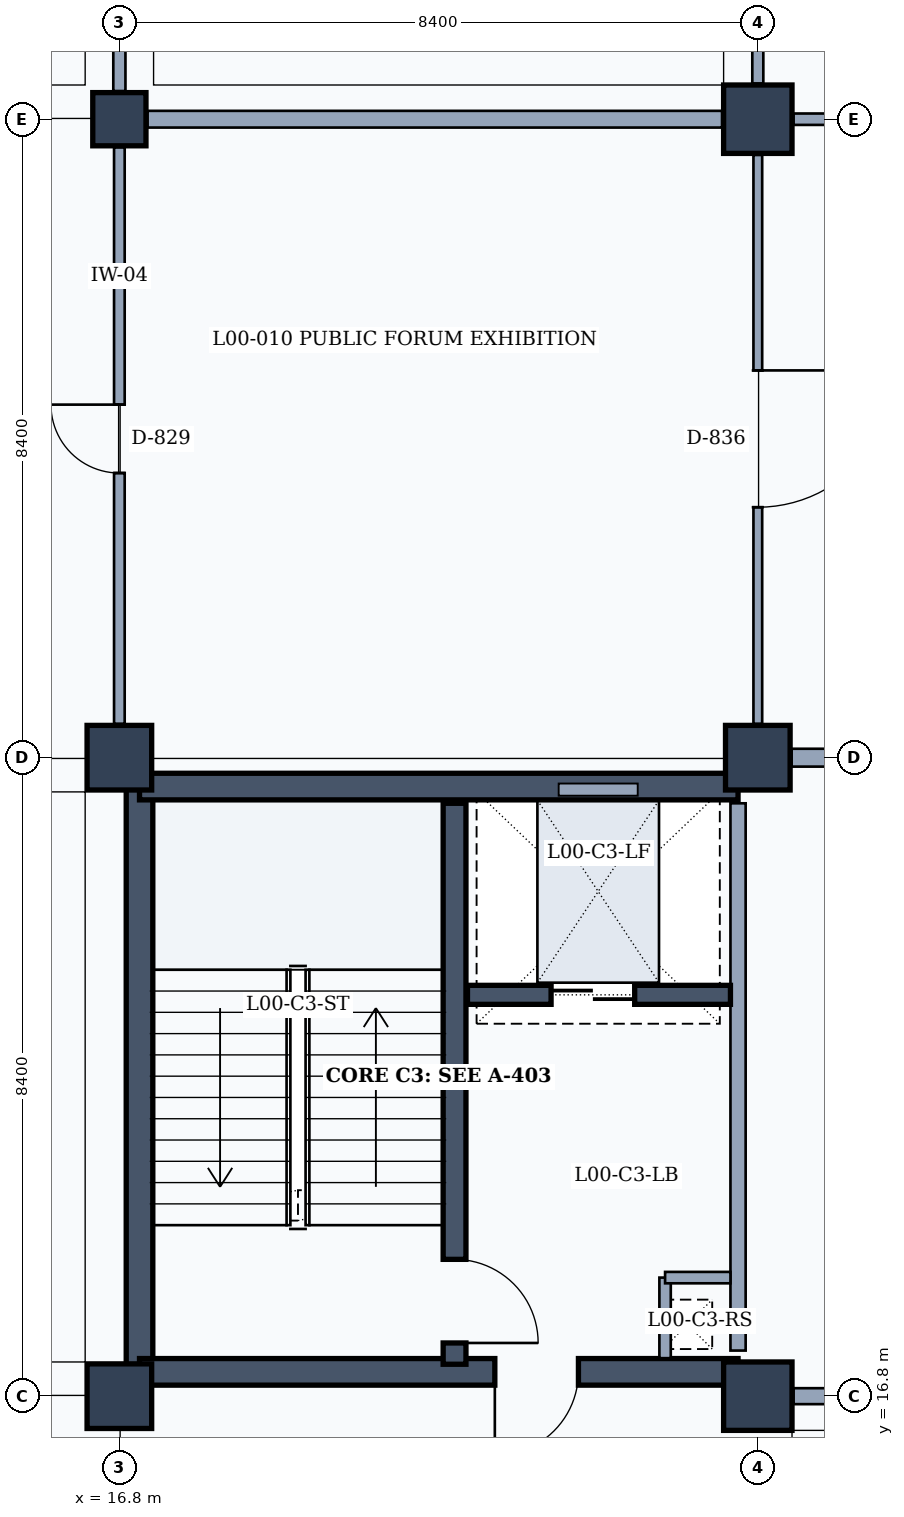
"""IFC4 building model, lengths in metres.
Left out: names, types, materials, properties, quantities, classifications, styles, units other than length and angle.
Written with IfcOpenShell. Run it as: python <this file> out.ifc"""

import sys

from ifc_helpers import new_model, si_unit, direction, frame, frame_2d, origin, origin_2d, place, context, subcontext, project, spatial, rectangle, extrude, element, fill, save


model = new_model("IFC4")
c1 = context("Model", 3, precision=1e-05, world=origin(), true_north=direction((0.0, 1.0)))
c2 = subcontext(c1, "Body", "Model", "MODEL_VIEW")
j1 = project(units=[si_unit("LENGTHUNIT", "METRE"), si_unit("PLANEANGLEUNIT", "RADIAN")], contexts=[c1])
p1 = place(None, origin())
s1 = spatial("IfcSite", under=j1, at=p1, CompositionType="ELEMENT")
p2 = place(p1, origin())
s2 = spatial("IfcBuilding", under=s1, at=p2, CompositionType="ELEMENT")
p3 = place(p2, origin())
s3 = spatial("IfcBuildingStorey", under=s2, at=p3, CompositionType="ELEMENT", Elevation=0.0)
for number, where, z_axis, x_axis in (
    (1, (16.8, 16.8, 0.0), (0.0, 0.0, 1.0), (1.0, 0.0, 0.0)),
    (2, (16.8, 25.2, 0.0), (0.0, 0.0, 1.0), (1.0, 0.0, 0.0)),
):
    element("IfcColumn", number, at=place(p3, frame(where, z_axis=z_axis, x_axis=x_axis)), inside=s3, PredefinedType="COLUMN", context=c2, shape_type="SweptSolid", body=[
        extrude(rectangle(XDim=0.85, YDim=0.85, at=origin_2d()), origin(), (0.0, 0.0, 1.0), 4.8),
    ])
p4 = place(p3, frame((16.8, 33.6, 0.0), z_axis=(0.0, 0.0, 1.0), x_axis=(1.0, 0.0, 0.0)))
e3 = element("IfcColumn", 3, at=p4, inside=s3, PredefinedType="COLUMN", context=c2, shape_type="SweptSolid", body=[
    extrude(rectangle(XDim=0.7, YDim=0.7, at=origin_2d()), origin(), (0.0, 0.0, 1.0), 4.8),
])
p5 = place(p3, frame((25.2, 16.8, 0.0), z_axis=(0.0, 0.0, 1.0), x_axis=(1.0, 0.0, 0.0)))
e4 = element("IfcColumn", 4, at=p5, inside=s3, PredefinedType="COLUMN", context=c2, shape_type="SweptSolid", body=[
    extrude(rectangle(XDim=0.9, YDim=0.9, at=origin_2d()), origin(), (0.0, 0.0, 1.0), 4.8),
])
p6 = place(p3, frame((25.2, 25.2, 0.0), z_axis=(0.0, 0.0, 1.0), x_axis=(1.0, 0.0, 0.0)))
e5 = element("IfcColumn", 5, at=p6, inside=s3, PredefinedType="COLUMN", context=c2, shape_type="SweptSolid", body=[
    extrude(rectangle(XDim=0.85, YDim=0.85, at=origin_2d()), origin(), (0.0, 0.0, 1.0), 4.8),
])
p7 = place(p3, frame((25.2, 33.6, 0.0), z_axis=(0.0, 0.0, 1.0), x_axis=(1.0, 0.0, 0.0)))
e6 = element("IfcColumn", 6, at=p7, inside=s3, PredefinedType="COLUMN", context=c2, shape_type="SweptSolid", body=[
    extrude(rectangle(XDim=0.9, YDim=0.9, at=origin_2d()), origin(), (0.0, 0.0, 1.0), 4.8),
])
p8 = place(p3, frame((17.065, 17.05, 0.0), z_axis=(0.0, 0.0, 1.0), x_axis=(0.0, 1.0, 0.0)))
e7 = element("IfcWall", 7, at=p8, inside=s3, PredefinedType="SHEAR", context=c2, shape_type="SweptSolid", body=[
    extrude(rectangle(XDim=7.94, YDim=0.35, at=frame_2d((3.97, 0.0))), origin(), (0.0, 0.0, 1.0), 4.54),
])
p9 = place(p3, frame((17.065, 24.82, 0.0), z_axis=(0.0, 0.0, 1.0), x_axis=(1.0, 0.0, 0.0)))
e8 = element("IfcWall", 8, at=p9, inside=s3, PredefinedType="SHEAR", context=c2, shape_type="SweptSolid", body=[
    extrude(rectangle(XDim=7.875, YDim=0.35, at=frame_2d((3.938, 0.0))), origin(), (0.0, 0.0, 1.0), 4.54),
])
p10 = place(p3, frame((24.94, 24.6, 0.0), z_axis=(0.0, 0.0, 1.0), x_axis=(0.0, -1.0, 0.0)))
e9 = element("IfcWall", 9, at=p10, inside=s3, PredefinedType="PARTITIONING", context=c2, shape_type="SweptSolid", body=[
    extrude(rectangle(XDim=7.2, YDim=0.2, at=frame_2d((3.6, 0.0))), origin(), (0.0, 0.0, 1.0), 3.92),
])
p11 = place(p3, frame((24.94, 17.12, 0.0), z_axis=(0.0, 0.0, 1.0), x_axis=(-1.0, 0.0, 0.0)))
e10 = element("IfcWall", 10, at=p11, inside=s3, PredefinedType="SHEAR", context=c2, shape_type="SweptSolid", body=[
    extrude(rectangle(XDim=7.875, YDim=0.35, at=frame_2d((3.938, 0.0))), origin(), (0.0, 0.0, 1.0), 4.54),
])
p12 = place(p11, frame((2.1, 0.0, 0.0)))
e11 = element("IfcOpeningElement", 11, at=p12, cuts=e10, PredefinedType="OPENING", context=c2, shape_type="SweptSolid", body=[
    extrude(rectangle(XDim=1.1, YDim=2.15, at=frame_2d((0.55, 1.075))), frame((0.0, 0.185, 0.0), z_axis=(0.0, -1.0, 0.0), x_axis=(1.0, 0.0, 0.0)), (0.0, 0.0, 1.0), 0.37),
])
p13 = place(p3, frame((21.21, 17.22, 0.0), z_axis=(0.0, 0.0, 1.0), x_axis=(0.0, 1.0, 0.0)))
e12 = element("IfcWall", 12, at=p13, inside=s3, PredefinedType="SHEAR", context=c2, shape_type="SweptSolid", body=[
    extrude(rectangle(XDim=7.38, YDim=0.3, at=frame_2d((3.69, 0.0))), origin(), (0.0, 0.0, 1.0), 4.54),
])
p14 = place(p13, frame((0.28, 0.0, 0.0)))
e13 = element("IfcOpeningElement", 13, at=p14, cuts=e12, PredefinedType="OPENING", context=c2, shape_type="SweptSolid", body=[
    extrude(rectangle(XDim=1.1, YDim=2.15, at=frame_2d((0.55, 1.075))), frame((0.0, 0.16, 0.0), z_axis=(0.0, -1.0, 0.0), x_axis=(1.0, 0.0, 0.0)), (0.0, 0.0, 1.0), 0.32),
])
p15 = place(p3, frame((23.98, 18.36, 0.0), z_axis=(0.0, 0.0, 1.0), x_axis=(0.0, -1.0, 0.0)))
e14 = element("IfcWall", 14, at=p15, inside=s3, PredefinedType="PARTITIONING", context=c2, shape_type="SweptSolid", body=[
    extrude(rectangle(XDim=1.06, YDim=0.15, at=frame_2d((0.53, 0.0))), origin(), (0.0, 0.0, 1.0), 3.92),
])
p16 = place(p3, frame((23.98, 18.36, 0.0), z_axis=(0.0, 0.0, 1.0), x_axis=(1.0, 0.0, 0.0)))
e15 = element("IfcWall", 15, at=p16, inside=s3, PredefinedType="PARTITIONING", context=c2, shape_type="SweptSolid", body=[
    extrude(rectangle(XDim=0.86, YDim=0.15, at=frame_2d((0.43, 0.0))), origin(), (0.0, 0.0, 1.0), 3.92),
])
p17 = place(p3, frame((21.38, 22.08, 0.0), z_axis=(0.0, 0.0, 1.0), x_axis=(1.0, 0.0, 0.0)))
e16 = element("IfcWall", 16, at=p17, inside=s3, PredefinedType="SHEAR", context=c2, shape_type="SweptSolid", body=[
    extrude(rectangle(XDim=3.46, YDim=0.25, at=frame_2d((1.73, 0.0))), origin(), (0.0, 0.0, 1.0), 4.54),
])
p18 = place(p17, frame((1.1, 0.0, 0.0)))
e17 = element("IfcOpeningElement", 17, at=p18, cuts=e16, PredefinedType="OPENING", context=c2, shape_type="SweptSolid", body=[
    extrude(rectangle(XDim=1.1, YDim=2.15, at=frame_2d((0.55, 1.075))), frame((0.0, 0.135, 0.0), z_axis=(0.0, -1.0, 0.0), x_axis=(1.0, 0.0, 0.0)), (0.0, 0.0, 1.0), 0.27),
])
p19 = place(p3, frame((16.8, 25.645, 0.0), z_axis=(0.0, 0.0, 1.0), x_axis=(0.0, 1.0, 0.0)))
e18 = element("IfcWall", 18, at=p19, inside=s3, PredefinedType="PARTITIONING", context=c2, shape_type="SweptSolid", body=[
    extrude(rectangle(XDim=7.585, YDim=0.14, at=frame_2d((3.792, 0.0))), origin(), (0.0, 0.0, 1.0), 3.92),
])
p20 = place(p19, frame((3.3, 0.0, 0.0)))
e19 = element("IfcOpeningElement", 19, at=p20, cuts=e18, PredefinedType="OPENING", context=c2, shape_type="SweptSolid", body=[
    extrude(rectangle(XDim=0.9, YDim=2.1, at=frame_2d((0.45, 1.05))), frame((0.0, 0.08, 0.0), z_axis=(0.0, -1.0, 0.0), x_axis=(1.0, 0.0, 0.0)), (0.0, 0.0, 1.0), 0.16),
])
p21 = place(p3, frame((16.8, 33.97, 0.0), z_axis=(0.0, 0.0, 1.0), x_axis=(0.0, 1.0, 0.0)))
e20 = element("IfcWall", 20, at=p21, inside=s3, PredefinedType="PARTITIONING", context=c2, shape_type="SweptSolid", body=[
    extrude(rectangle(XDim=7.71, YDim=0.16, at=frame_2d((3.855, 0.0))), origin(), (0.0, 0.0, 1.0), 3.92),
])
p22 = place(p21, frame((3.125, 0.0, 0.0)))
e21 = element("IfcOpeningElement", 21, at=p22, cuts=e20, PredefinedType="OPENING", context=c2, shape_type="SweptSolid", body=[
    extrude(rectangle(XDim=1.25, YDim=2.3, at=frame_2d((0.625, 1.15))), frame((0.0, 0.09, 0.0), z_axis=(0.0, -1.0, 0.0), x_axis=(1.0, 0.0, 0.0)), (0.0, 0.0, 1.0), 0.18),
])
p23 = place(p3, frame((25.2, 25.645, 0.0), z_axis=(0.0, 0.0, 1.0), x_axis=(0.0, 1.0, 0.0)))
e22 = element("IfcWall", 22, at=p23, inside=s3, PredefinedType="PARTITIONING", context=c2, shape_type="SweptSolid", body=[
    extrude(rectangle(XDim=7.485, YDim=0.115, at=frame_2d((3.742, 0.0))), origin(), (0.0, 0.0, 1.0), 3.92),
])
p24 = place(p23, frame((2.85, 0.0, 0.0)))
e23 = element("IfcOpeningElement", 23, at=p24, cuts=e22, PredefinedType="OPENING", context=c2, shape_type="SweptSolid", body=[
    extrude(rectangle(XDim=1.8, YDim=2.3, at=frame_2d((0.9, 1.15))), frame((0.0, 0.067, 0.0), z_axis=(0.0, -1.0, 0.0), x_axis=(1.0, 0.0, 0.0)), (0.0, 0.0, 1.0), 0.135),
])
p25 = place(p3, frame((17.17, 33.6, 0.0), z_axis=(0.0, 0.0, 1.0), x_axis=(1.0, 0.0, 0.0)))
e24 = element("IfcWall", 24, at=p25, inside=s3, PredefinedType="PARTITIONING", context=c2, shape_type="SweptSolid", body=[
    extrude(rectangle(XDim=7.56, YDim=0.22, at=frame_2d((3.78, 0.0))), origin(), (0.0, 0.0, 1.0), 3.85),
])
p26 = place(p3, frame((25.2, 34.07, 0.0), z_axis=(0.0, 0.0, 1.0), x_axis=(0.0, 1.0, 0.0)))
e25 = element("IfcWall", 25, at=p26, inside=s3, PredefinedType="PARTITIONING", context=c2, shape_type="SweptSolid", body=[
    extrude(rectangle(XDim=7.61, YDim=0.145, at=frame_2d((3.805, 0.0))), origin(), (0.0, 0.0, 1.0), 3.92),
])
p27 = place(p26, frame((3.05, 0.0, 0.0)))
e26 = element("IfcOpeningElement", 26, at=p27, cuts=e25, PredefinedType="OPENING", context=c2, shape_type="SweptSolid", body=[
    extrude(rectangle(XDim=1.4, YDim=2.25, at=frame_2d((0.7, 1.125))), frame((0.0, 0.083, 0.0), z_axis=(0.0, -1.0, 0.0), x_axis=(1.0, 0.0, 0.0)), (0.0, 0.0, 1.0), 0.165),
])
p28 = place(p3, frame((25.67, 16.8, 0.0), z_axis=(0.0, 0.0, 1.0), x_axis=(1.0, 0.0, 0.0)))
e27 = element("IfcWall", 27, at=p28, inside=s3, PredefinedType="PARTITIONING", context=c2, shape_type="SweptSolid", body=[
    extrude(rectangle(XDim=7.845, YDim=0.21, at=frame_2d((3.922, 0.0))), origin(), (0.0, 0.0, 1.0), 3.92),
])
p29 = place(p28, frame((2.85, 0.0, 0.0)))
e28 = element("IfcOpeningElement", 28, at=p29, cuts=e27, PredefinedType="OPENING", context=c2, shape_type="SweptSolid", body=[
    extrude(rectangle(XDim=1.8, YDim=2.3, at=frame_2d((0.9, 1.15))), frame((0.0, 0.115, 0.0), z_axis=(0.0, -1.0, 0.0), x_axis=(1.0, 0.0, 0.0)), (0.0, 0.0, 1.0), 0.23),
])
p30 = place(p3, frame((25.645, 25.2, 0.0), z_axis=(0.0, 0.0, 1.0), x_axis=(1.0, 0.0, 0.0)))
e29 = element("IfcWall", 29, at=p30, inside=s3, PredefinedType="PARTITIONING", context=c2, shape_type="SweptSolid", body=[
    extrude(rectangle(XDim=7.585, YDim=0.235, at=frame_2d((3.792, 0.0))), origin(), (0.0, 0.0, 1.0), 3.85),
])
p31 = place(p3, frame((25.67, 33.6, 0.0), z_axis=(0.0, 0.0, 1.0), x_axis=(1.0, 0.0, 0.0)))
e30 = element("IfcWall", 30, at=p31, inside=s3, PredefinedType="PARTITIONING", context=c2, shape_type="SweptSolid", body=[
    extrude(rectangle(XDim=7.845, YDim=0.15, at=frame_2d((3.922, 0.0))), origin(), (0.0, 0.0, 1.0), 3.92),
])
p32 = place(p12, origin())
e31 = element("IfcDoor", 31, at=p32, inside=s3, OperationType="SINGLE_SWING_RIGHT", PredefinedType="DOOR", context=c2, shape_type="SweptSolid", body=[
    extrude(rectangle(XDim=1.1, YDim=2.15, at=frame_2d((0.55, 1.075))), frame((0.0, 0.025, 0.0), z_axis=(0.0, -1.0, 0.0), x_axis=(1.0, 0.0, 0.0)), (0.0, 0.0, 1.0), 0.05),
])
fill(e11, e31)
p33 = place(p14, frame((1.1, 0.0, 0.0), z_axis=(0.0, 0.0, 1.0), x_axis=(-1.0, 0.0, 0.0)))
e32 = element("IfcDoor", 32, at=p33, inside=s3, OperationType="SINGLE_SWING_RIGHT", PredefinedType="DOOR", context=c2, shape_type="SweptSolid", body=[
    extrude(rectangle(XDim=1.1, YDim=2.15, at=frame_2d((0.55, 1.075))), frame((0.0, 0.025, 0.0), z_axis=(0.0, -1.0, 0.0), x_axis=(1.0, 0.0, 0.0)), (0.0, 0.0, 1.0), 0.05),
])
fill(e13, e32)
p34 = place(p18, origin())
e33 = element("IfcDoor", 33, at=p34, inside=s3, OperationType="DOUBLE_DOOR_SLIDING", PredefinedType="DOOR", context=c2, shape_type="SweptSolid", body=[
    extrude(rectangle(XDim=1.1, YDim=2.15, at=frame_2d((0.55, 1.075))), frame((0.0, 0.025, 0.0), z_axis=(0.0, -1.0, 0.0), x_axis=(1.0, 0.0, 0.0)), (0.0, 0.0, 1.0), 0.05),
])
fill(e17, e33)
p35 = place(p20, origin())
e34 = element("IfcDoor", 34, at=p35, inside=s3, OperationType="SINGLE_SWING_RIGHT", PredefinedType="DOOR", context=c2, shape_type="SweptSolid", body=[
    extrude(rectangle(XDim=0.9, YDim=2.1, at=frame_2d((0.45, 1.05))), frame((0.0, 0.025, 0.0), z_axis=(0.0, -1.0, 0.0), x_axis=(1.0, 0.0, 0.0)), (0.0, 0.0, 1.0), 0.05),
])
fill(e19, e34)
p36 = place(p24, frame((1.8, 0.0, 0.0), z_axis=(0.0, 0.0, 1.0), x_axis=(-1.0, 0.0, 0.0)))
e35 = element("IfcDoor", 35, at=p36, inside=s3, OperationType="SINGLE_SWING_LEFT", PredefinedType="DOOR", context=c2, shape_type="SweptSolid", body=[
    extrude(rectangle(XDim=1.8, YDim=2.3, at=frame_2d((0.9, 1.15))), frame((0.0, 0.025, 0.0), z_axis=(0.0, -1.0, 0.0), x_axis=(1.0, 0.0, 0.0)), (0.0, 0.0, 1.0), 0.05),
])
fill(e23, e35)
save(model, sys.argv[1])
